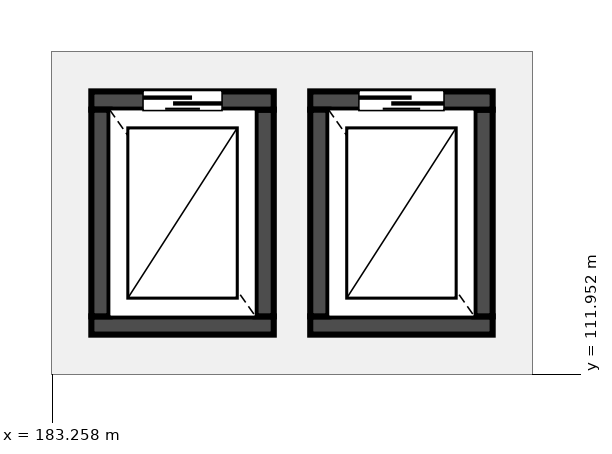
"""IFC4 building model, lengths in metres.
Left out: names, types, materials, properties, quantities, classifications, styles, units other than length and angle.
Written with IfcOpenShell. Run it as: python <this file> out.ifc"""

import sys

from ifc_helpers import new_model, si_unit, direction, frame, frame_2d, origin, place, context, subcontext, project, spatial, rectangle, extrude, element, fill, save


model = new_model("IFC4")
c1 = context("Model", 3, precision=1e-05, world=origin(), true_north=direction((0.0, 1.0)))
c2 = subcontext(c1, "Body", "Model", "MODEL_VIEW")
j1 = project(units=[si_unit("LENGTHUNIT", "METRE"), si_unit("PLANEANGLEUNIT", "RADIAN")], contexts=[c1])
p1 = place(None, origin())
s1 = spatial("IfcSite", under=j1, at=p1, CompositionType="ELEMENT")
p2 = place(p1, origin())
s2 = spatial("IfcBuilding", under=s1, at=p2, CompositionType="ELEMENT")
p3 = place(p2, frame((0.0, 0.0, 17.8)))
s3 = spatial("IfcBuildingStorey", under=s2, at=p3, CompositionType="ELEMENT", Elevation=17.8)
p4 = place(p3, frame((183.9, 112.75, 0.0), z_axis=(0.0, 0.0, 1.0), x_axis=(1.0, 0.0, 0.0)))
e1 = element("IfcWall", 1, at=p4, inside=s3, PredefinedType="SHEAR", context=c2, shape_type="SweptSolid", body=[
    extrude(rectangle(XDim=3.0, YDim=0.3, at=frame_2d((1.5, 0.0))), origin(), (0.0, 0.0, 1.0), 4.2),
])
p5 = place(p3, frame((186.75, 112.9, 0.0), z_axis=(0.0, 0.0, 1.0), x_axis=(0.0, 1.0, 0.0)))
e2 = element("IfcWall", 2, at=p5, inside=s3, PredefinedType="SHEAR", context=c2, shape_type="SweptSolid", body=[
    extrude(rectangle(XDim=3.4, YDim=0.3, at=frame_2d((1.7, 0.0))), origin(), (0.0, 0.0, 1.0), 4.2),
])
p6 = place(p3, frame((186.9, 116.45, 0.0), z_axis=(0.0, 0.0, 1.0), x_axis=(-1.0, 0.0, 0.0)))
e3 = element("IfcWall", 3, at=p6, inside=s3, PredefinedType="SHEAR", context=c2, shape_type="SweptSolid", body=[
    extrude(rectangle(XDim=3.0, YDim=0.3, at=frame_2d((1.5, 0.0))), origin(), (0.0, 0.0, 1.0), 4.2),
])
p7 = place(p6, frame((0.85, 0.0, 0.0)))
e4 = element("IfcOpeningElement", 4, at=p7, cuts=e3, PredefinedType="OPENING", context=c2, shape_type="SweptSolid", body=[
    extrude(rectangle(XDim=1.3, YDim=2.3, at=frame_2d((0.65, 1.15))), frame((0.0, 0.16, 0.0), z_axis=(0.0, -1.0, 0.0), x_axis=(1.0, 0.0, 0.0)), (0.0, 0.0, 1.0), 0.32),
])
p8 = place(p3, frame((184.05, 116.3, 0.0), z_axis=(0.0, 0.0, 1.0), x_axis=(0.0, -1.0, 0.0)))
e5 = element("IfcWall", 5, at=p8, inside=s3, PredefinedType="SHEAR", context=c2, shape_type="SweptSolid", body=[
    extrude(rectangle(XDim=3.4, YDim=0.3, at=frame_2d((1.7, 0.0))), origin(), (0.0, 0.0, 1.0), 4.2),
])
p9 = place(p3, frame((187.5, 112.75, 0.0), z_axis=(0.0, 0.0, 1.0), x_axis=(1.0, 0.0, 0.0)))
e6 = element("IfcWall", 6, at=p9, inside=s3, PredefinedType="SHEAR", context=c2, shape_type="SweptSolid", body=[
    extrude(rectangle(XDim=3.0, YDim=0.3, at=frame_2d((1.5, 0.0))), origin(), (0.0, 0.0, 1.0), 4.2),
])
p10 = place(p3, frame((190.35, 112.9, 0.0), z_axis=(0.0, 0.0, 1.0), x_axis=(0.0, 1.0, 0.0)))
e7 = element("IfcWall", 7, at=p10, inside=s3, PredefinedType="SHEAR", context=c2, shape_type="SweptSolid", body=[
    extrude(rectangle(XDim=3.4, YDim=0.3, at=frame_2d((1.7, 0.0))), origin(), (0.0, 0.0, 1.0), 4.2),
])
p11 = place(p3, frame((190.5, 116.45, 0.0), z_axis=(0.0, 0.0, 1.0), x_axis=(-1.0, 0.0, 0.0)))
e8 = element("IfcWall", 8, at=p11, inside=s3, PredefinedType="SHEAR", context=c2, shape_type="SweptSolid", body=[
    extrude(rectangle(XDim=3.0, YDim=0.3, at=frame_2d((1.5, 0.0))), origin(), (0.0, 0.0, 1.0), 4.2),
])
p12 = place(p11, frame((0.8, 0.0, 0.0)))
e9 = element("IfcOpeningElement", 9, at=p12, cuts=e8, PredefinedType="OPENING", context=c2, shape_type="SweptSolid", body=[
    extrude(rectangle(XDim=1.4, YDim=2.3, at=frame_2d((0.7, 1.15))), frame((0.0, 0.16, 0.0), z_axis=(0.0, -1.0, 0.0), x_axis=(1.0, 0.0, 0.0)), (0.0, 0.0, 1.0), 0.32),
])
p13 = place(p3, frame((187.65, 116.3, 0.0), z_axis=(0.0, 0.0, 1.0), x_axis=(0.0, -1.0, 0.0)))
e10 = element("IfcWall", 10, at=p13, inside=s3, PredefinedType="SHEAR", context=c2, shape_type="SweptSolid", body=[
    extrude(rectangle(XDim=3.4, YDim=0.3, at=frame_2d((1.7, 0.0))), origin(), (0.0, 0.0, 1.0), 4.2),
])
p14 = place(p7, origin())
e11 = element("IfcDoor", 11, at=p14, inside=s3, OperationType="SLIDING_TO_LEFT", PredefinedType="DOOR", context=c2, shape_type="SweptSolid", body=[
    extrude(rectangle(XDim=1.3, YDim=2.3, at=frame_2d((0.65, 1.15))), frame((0.0, 0.025, 0.0), z_axis=(0.0, -1.0, 0.0), x_axis=(1.0, 0.0, 0.0)), (0.0, 0.0, 1.0), 0.05),
])
fill(e4, e11)
p15 = place(p12, origin())
e12 = element("IfcDoor", 12, at=p15, inside=s3, OperationType="SLIDING_TO_LEFT", PredefinedType="DOOR", context=c2, shape_type="SweptSolid", body=[
    extrude(rectangle(XDim=1.4, YDim=2.3, at=frame_2d((0.7, 1.15))), frame((0.0, 0.025, 0.0), z_axis=(0.0, -1.0, 0.0), x_axis=(1.0, 0.0, 0.0)), (0.0, 0.0, 1.0), 0.05),
])
fill(e9, e12)
save(model, sys.argv[1])
